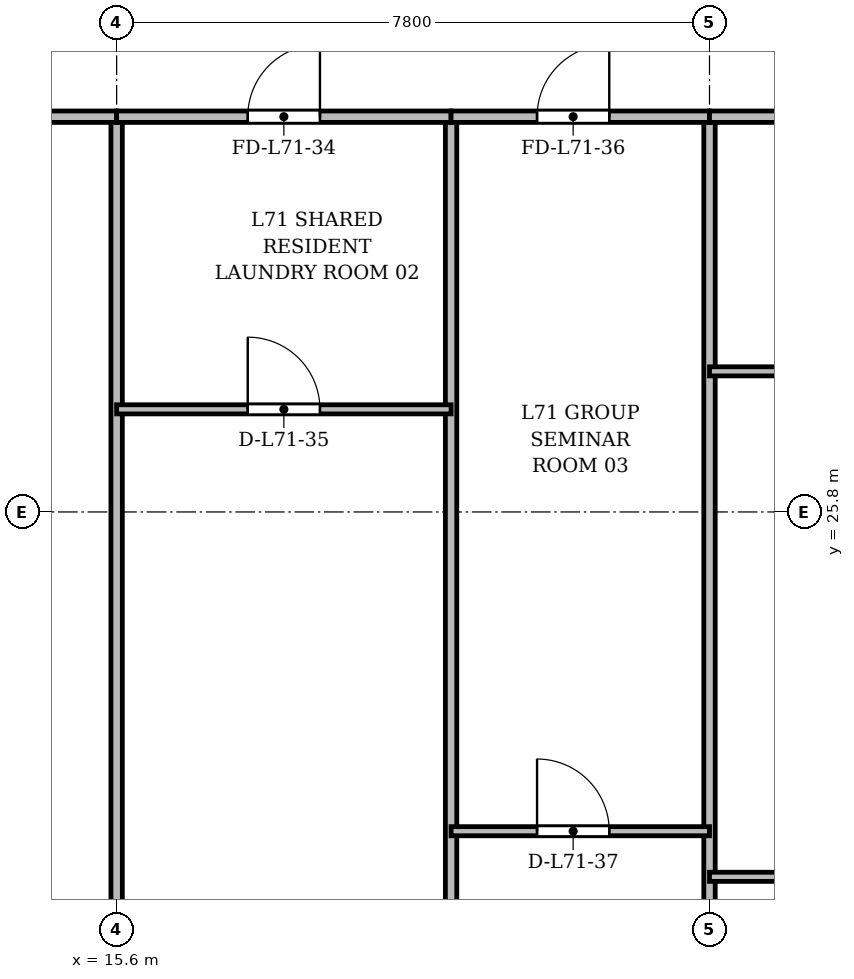
"""IFC4 building model, lengths in metres.
Left out: names, types, materials, properties, quantities, classifications, styles, units other than length and angle.
Written with IfcOpenShell. Run it as: python <this file> out.ifc"""

import sys

from ifc_helpers import new_model, si_unit, direction, frame, frame_2d, origin, place, context, subcontext, project, spatial, rectangle, extrude, source, transform, mapped, element, fill, save


model = new_model("IFC4")
c1 = context("Model", 3, precision=1e-05, world=origin(), true_north=direction((0.0, 1.0)))
c2 = subcontext(c1, "Body", "Model", "MODEL_VIEW")
j1 = project(units=[si_unit("LENGTHUNIT", "METRE"), si_unit("PLANEANGLEUNIT", "RADIAN")], contexts=[c1])
p1 = place(None, origin())
s1 = spatial("IfcSite", under=j1, at=p1, CompositionType="ELEMENT")
p2 = place(p1, origin())
s2 = spatial("IfcBuilding", under=s1, at=p2, CompositionType="ELEMENT")
p3 = place(p2, frame((0.0, 0.0, 273.9)))
s3 = spatial("IfcBuildingStorey", under=s2, at=p3, CompositionType="ELEMENT", Elevation=273.9)
p4 = place(p3, frame((15.6, 3.725, 0.0), z_axis=(0.0, 0.0, 1.0), x_axis=(0.0, 1.0, 0.0)))
e1 = element("IfcWall", 1, at=p4, inside=s3, PredefinedType="PARTITIONING", context=c2, shape_type="SweptSolid", body=[
    extrude(rectangle(XDim=27.275, YDim=0.15, at=frame_2d((13.637, 0.0))), origin(), (0.0, 0.0, 1.0), 2.87),
])
p5 = place(p3, frame((20.0, 3.725, 0.0), z_axis=(0.0, 0.0, 1.0), x_axis=(0.0, 1.0, 0.0)))
e2 = element("IfcWall", 2, at=p5, inside=s3, PredefinedType="PARTITIONING", context=c2, shape_type="SweptSolid", body=[
    extrude(rectangle(XDim=27.275, YDim=0.15, at=frame_2d((13.637, 0.0))), origin(), (0.0, 0.0, 1.0), 2.92),
])
p6 = place(p3, frame((23.4, 3.725, 0.0), z_axis=(0.0, 0.0, 1.0), x_axis=(0.0, 1.0, 0.0)))
e3 = element("IfcWall", 3, at=p6, inside=s3, PredefinedType="PARTITIONING", context=c2, shape_type="SweptSolid", body=[
    extrude(rectangle(XDim=27.275, YDim=0.15, at=frame_2d((13.637, 0.0))), origin(), (0.0, 0.0, 1.0), 2.87),
])
p7 = place(p3, frame((8.425, 31.0, 0.0), z_axis=(0.0, 0.0, 1.0), x_axis=(1.0, 0.0, 0.0)))
e4 = element("IfcWall", 4, at=p7, inside=s3, PredefinedType="PARTITIONING", context=c2, shape_type="SweptSolid", body=[
    extrude(rectangle(XDim=7.175, YDim=0.15, at=frame_2d((3.587, 0.0))), origin(), (0.0, 0.0, 1.0), 2.87),
])
p8 = place(p7, frame((4.681, 0.0, 0.0)))
e5 = element("IfcOpeningElement", 5, at=p8, cuts=e4, PredefinedType="OPENING", context=c2, shape_type="SweptSolid", body=[
    extrude(rectangle(XDim=0.95, YDim=2.15, at=frame_2d((0.475, 1.075))), frame((0.0, 0.085, 0.0), z_axis=(0.0, -1.0, 0.0), x_axis=(1.0, 0.0, 0.0)), (0.0, 0.0, 1.0), 0.17),
])
p9 = place(p3, frame((15.6, 31.0, 0.0), z_axis=(0.0, 0.0, 1.0), x_axis=(1.0, 0.0, 0.0)))
e6 = element("IfcWall", 6, at=p9, inside=s3, PredefinedType="PARTITIONING", context=c2, shape_type="SweptSolid", body=[
    extrude(rectangle(XDim=4.4, YDim=0.15, at=frame_2d((2.2, 0.0))), origin(), (0.0, 0.0, 1.0), 2.87),
])
p10 = place(p9, frame((1.725, 0.0, 0.0)))
e7 = element("IfcOpeningElement", 7, at=p10, cuts=e6, PredefinedType="OPENING", context=c2, shape_type="SweptSolid", body=[
    extrude(rectangle(XDim=0.95, YDim=2.15, at=frame_2d((0.475, 1.075))), frame((0.0, 0.085, 0.0), z_axis=(0.0, -1.0, 0.0), x_axis=(1.0, 0.0, 0.0)), (0.0, 0.0, 1.0), 0.17),
])
p11 = place(p3, frame((15.6, 27.15, 0.0), z_axis=(0.0, 0.0, 1.0), x_axis=(1.0, 0.0, 0.0)))
e8 = element("IfcWall", 8, at=p11, inside=s3, PredefinedType="PARTITIONING", context=c2, shape_type="SweptSolid", body=[
    extrude(rectangle(XDim=4.4, YDim=0.12, at=frame_2d((2.2, 0.0))), origin(), (0.0, 0.0, 1.0), 2.87),
])
p12 = place(p11, frame((1.725, 0.0, 0.0)))
e9 = element("IfcOpeningElement", 9, at=p12, cuts=e8, PredefinedType="OPENING", context=c2, shape_type="SweptSolid", body=[
    extrude(rectangle(XDim=0.95, YDim=2.15, at=frame_2d((0.475, 1.075))), frame((0.0, 0.07, 0.0), z_axis=(0.0, -1.0, 0.0), x_axis=(1.0, 0.0, 0.0)), (0.0, 0.0, 1.0), 0.14),
])
p13 = place(p3, frame((20.0, 31.0, 0.0), z_axis=(0.0, 0.0, 1.0), x_axis=(1.0, 0.0, 0.0)))
e10 = element("IfcWall", 10, at=p13, inside=s3, PredefinedType="PARTITIONING", context=c2, shape_type="SweptSolid", body=[
    extrude(rectangle(XDim=3.4, YDim=0.15, at=frame_2d((1.7, 0.0))), origin(), (0.0, 0.0, 1.0), 2.87),
])
p14 = place(p13, frame((1.131, 0.0, 0.0)))
e11 = element("IfcOpeningElement", 11, at=p14, cuts=e10, PredefinedType="OPENING", context=c2, shape_type="SweptSolid", body=[
    extrude(rectangle(XDim=0.95, YDim=2.15, at=frame_2d((0.475, 1.075))), frame((0.0, 0.085, 0.0), z_axis=(0.0, -1.0, 0.0), x_axis=(1.0, 0.0, 0.0)), (0.0, 0.0, 1.0), 0.17),
])
p15 = place(p3, frame((20.0, 21.6, 0.0), z_axis=(0.0, 0.0, 1.0), x_axis=(1.0, 0.0, 0.0)))
e12 = element("IfcWall", 12, at=p15, inside=s3, PredefinedType="PARTITIONING", context=c2, shape_type="SweptSolid", body=[
    extrude(rectangle(XDim=3.4, YDim=0.12, at=frame_2d((1.7, 0.0))), origin(), (0.0, 0.0, 1.0), 2.87),
])
p16 = place(p15, frame((1.131, 0.0, 0.0)))
e13 = element("IfcOpeningElement", 13, at=p16, cuts=e12, PredefinedType="OPENING", context=c2, shape_type="SweptSolid", body=[
    extrude(rectangle(XDim=0.95, YDim=2.15, at=frame_2d((0.475, 1.075))), frame((0.0, 0.07, 0.0), z_axis=(0.0, -1.0, 0.0), x_axis=(1.0, 0.0, 0.0)), (0.0, 0.0, 1.0), 0.14),
])
p17 = place(p3, frame((23.4, 21.0, 0.0), z_axis=(0.0, 0.0, 1.0), x_axis=(1.0, 0.0, 0.0)))
e14 = element("IfcWall", 14, at=p17, inside=s3, PredefinedType="PARTITIONING", context=c2, shape_type="SweptSolid", body=[
    extrude(rectangle(XDim=7.2, YDim=0.12, at=frame_2d((3.6, 0.0))), origin(), (0.0, 0.0, 1.0), 2.87),
])
p18 = place(p17, frame((3.125, 0.0, 0.0)))
e15 = element("IfcOpeningElement", 15, at=p18, cuts=e14, PredefinedType="OPENING", context=c2, shape_type="SweptSolid", body=[
    extrude(rectangle(XDim=0.95, YDim=2.15, at=frame_2d((0.475, 1.075))), frame((0.0, 0.07, 0.0), z_axis=(0.0, -1.0, 0.0), x_axis=(1.0, 0.0, 0.0)), (0.0, 0.0, 1.0), 0.14),
])
p19 = place(p3, frame((23.4, 27.65, 0.0), z_axis=(0.0, 0.0, 1.0), x_axis=(1.0, 0.0, 0.0)))
e16 = element("IfcWall", 16, at=p19, inside=s3, PredefinedType="PARTITIONING", context=c2, shape_type="SweptSolid", body=[
    extrude(rectangle(XDim=2.4, YDim=0.12, at=frame_2d((1.2, 0.0))), origin(), (0.0, 0.0, 1.0), 2.87),
])
p20 = place(p3, frame((23.4, 31.0, 0.0), z_axis=(0.0, 0.0, 1.0), x_axis=(1.0, 0.0, 0.0)))
e17 = element("IfcWall", 17, at=p20, inside=s3, PredefinedType="PARTITIONING", context=c2, shape_type="SweptSolid", body=[
    extrude(rectangle(XDim=7.2, YDim=0.15, at=frame_2d((3.6, 0.0))), origin(), (0.0, 0.0, 1.0), 2.87),
])
p21 = place(p20, frame((4.706, 0.0, 0.0)))
e18 = element("IfcOpeningElement", 18, at=p21, cuts=e17, PredefinedType="OPENING", context=c2, shape_type="SweptSolid", body=[
    extrude(rectangle(XDim=0.95, YDim=2.15, at=frame_2d((0.475, 1.075))), frame((0.0, 0.085, 0.0), z_axis=(0.0, -1.0, 0.0), x_axis=(1.0, 0.0, 0.0)), (0.0, 0.0, 1.0), 0.17),
])
m1 = source(origin(), c2, "Body", "SweptSolid", [
    extrude(rectangle(XDim=0.95, YDim=2.15, at=frame_2d((0.475, 1.075))), frame((0.0, 0.025, 0.0), z_axis=(0.0, -1.0, 0.0), x_axis=(1.0, 0.0, 0.0)), (0.0, 0.0, 1.0), 0.05),
])
p22 = place(p10, origin())
e19 = element("IfcDoor", 19, at=p22, inside=s3, OperationType="SINGLE_SWING_RIGHT", PredefinedType="DOOR", context=c2, shape_type="MappedRepresentation", body=[
    mapped(m1, transform((0.0, 0.0, 0.0), x_axis=(1.0, 0.0, 0.0), y_axis=(0.0, 1.0, 0.0), z_axis=(0.0, 0.0, 1.0), scale=1.0)),
])
fill(e7, e19)
p23 = place(p12, origin())
e20 = element("IfcDoor", 20, at=p23, inside=s3, OperationType="SINGLE_SWING_LEFT", PredefinedType="DOOR", context=c2, shape_type="MappedRepresentation", body=[
    mapped(m1, transform((0.0, 0.0, 0.0), x_axis=(1.0, 0.0, 0.0), y_axis=(0.0, 1.0, 0.0), z_axis=(0.0, 0.0, 1.0), scale=1.0)),
])
fill(e9, e20)
p24 = place(p14, origin())
e21 = element("IfcDoor", 21, at=p24, inside=s3, OperationType="SINGLE_SWING_RIGHT", PredefinedType="DOOR", context=c2, shape_type="MappedRepresentation", body=[
    mapped(m1, transform((0.0, 0.0, 0.0), x_axis=(1.0, 0.0, 0.0), y_axis=(0.0, 1.0, 0.0), z_axis=(0.0, 0.0, 1.0), scale=1.0)),
])
fill(e11, e21)
p25 = place(p16, origin())
e22 = element("IfcDoor", 22, at=p25, inside=s3, OperationType="SINGLE_SWING_LEFT", PredefinedType="DOOR", context=c2, shape_type="MappedRepresentation", body=[
    mapped(m1, transform((0.0, 0.0, 0.0), x_axis=(1.0, 0.0, 0.0), y_axis=(0.0, 1.0, 0.0), z_axis=(0.0, 0.0, 1.0), scale=1.0)),
])
fill(e13, e22)
save(model, sys.argv[1])
